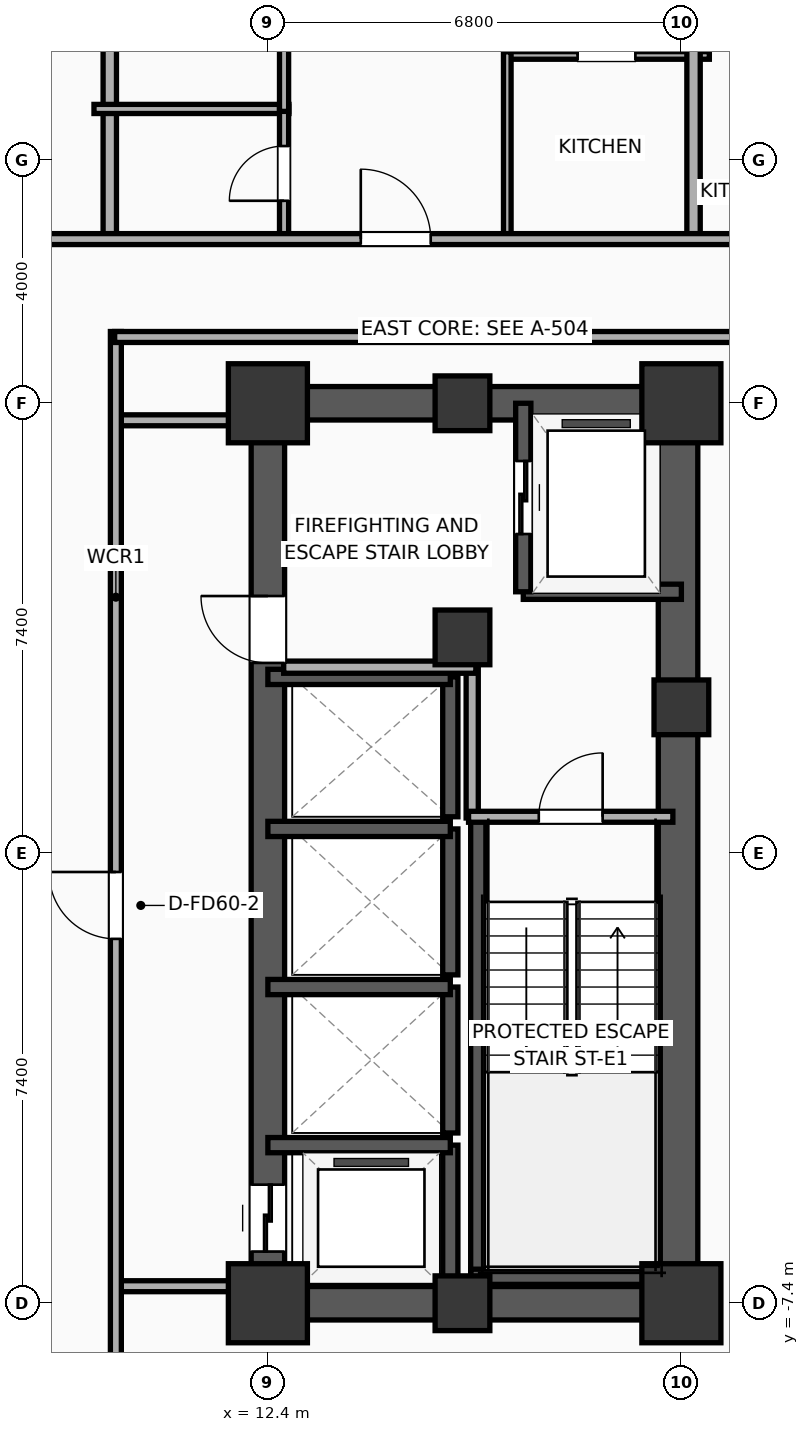
"""IFC4 building model, lengths in metres.
Left out: names, types, materials, properties, quantities, classifications, styles, units other than length and angle.
Written with IfcOpenShell. Run it as: python <this file> out.ifc"""

import sys

from ifc_helpers import new_model, si_unit, direction, frame, frame_2d, origin, origin_2d, place, context, subcontext, project, spatial, rectangle, extrude, element, fill, save


model = new_model("IFC4")
c1 = context("Model", 3, precision=1e-05, world=origin(), true_north=direction((0.0, 1.0)))
c2 = subcontext(c1, "Body", "Model", "MODEL_VIEW")
j1 = project(units=[si_unit("LENGTHUNIT", "METRE"), si_unit("PLANEANGLEUNIT", "RADIAN")], contexts=[c1])
p1 = place(None, origin())
s1 = spatial("IfcSite", under=j1, at=p1, CompositionType="ELEMENT")
p2 = place(p1, origin())
s2 = spatial("IfcBuilding", under=s1, at=p2, CompositionType="ELEMENT")
p3 = place(p2, frame((0.0, 0.0, 97.5)))
s3 = spatial("IfcBuildingStorey", under=s2, at=p3, CompositionType="ELEMENT", Elevation=97.5)
p4 = place(p3, frame((12.4, -7.4, 0.0), z_axis=(0.0, 0.0, 1.0), x_axis=(1.0, 0.0, 0.0)))
e1 = element("IfcColumn", 1, at=p4, inside=s3, PredefinedType="COLUMN", context=c2, shape_type="SweptSolid", body=[
    extrude(rectangle(XDim=1.3, YDim=1.3, at=origin_2d()), origin(), (0.0, 0.0, 1.0), 3.9),
])
p5 = place(p3, frame((15.6, 3.55, 0.0), z_axis=(0.0, 0.0, 1.0), x_axis=(1.0, 0.0, 0.0)))
e2 = element("IfcColumn", 2, at=p5, inside=s3, PredefinedType="COLUMN", context=c2, shape_type="SweptSolid", body=[
    extrude(rectangle(XDim=0.9, YDim=0.9, at=origin_2d()), origin(), (0.0, 0.0, 1.0), 3.9),
])
p6 = place(p3, frame((12.4, 7.4, 0.0), z_axis=(0.0, 0.0, 1.0), x_axis=(1.0, 0.0, 0.0)))
e3 = element("IfcColumn", 3, at=p6, inside=s3, PredefinedType="COLUMN", context=c2, shape_type="SweptSolid", body=[
    extrude(rectangle(XDim=1.3, YDim=1.3, at=origin_2d()), origin(), (0.0, 0.0, 1.0), 3.9),
])
for number, where, z_axis, x_axis in (
    (4, (15.6, -7.4, 0.0), (0.0, 0.0, 1.0), (1.0, 0.0, 0.0)),
    (5, (15.6, 7.4, 0.0), (0.0, 0.0, 1.0), (1.0, 0.0, 0.0)),
):
    element("IfcColumn", number, at=place(p3, frame(where, z_axis=z_axis, x_axis=x_axis)), inside=s3, PredefinedType="COLUMN", context=c2, shape_type="SweptSolid", body=[
        extrude(rectangle(XDim=0.9, YDim=0.9, at=origin_2d()), origin(), (0.0, 0.0, 1.0), 3.9),
    ])
p7 = place(p3, frame((19.2, -7.4, 0.0), z_axis=(0.0, 0.0, 1.0), x_axis=(1.0, 0.0, 0.0)))
e6 = element("IfcColumn", 6, at=p7, inside=s3, PredefinedType="COLUMN", context=c2, shape_type="SweptSolid", body=[
    extrude(rectangle(XDim=1.3, YDim=1.3, at=origin_2d()), origin(), (0.0, 0.0, 1.0), 3.9),
])
p8 = place(p3, frame((19.2, 2.4, 0.0), z_axis=(0.0, 0.0, 1.0), x_axis=(1.0, 0.0, 0.0)))
e7 = element("IfcColumn", 7, at=p8, inside=s3, PredefinedType="COLUMN", context=c2, shape_type="SweptSolid", body=[
    extrude(rectangle(XDim=0.9, YDim=0.9, at=origin_2d()), origin(), (0.0, 0.0, 1.0), 3.9),
])
p9 = place(p3, frame((19.2, 7.4, 0.0), z_axis=(0.0, 0.0, 1.0), x_axis=(1.0, 0.0, 0.0)))
e8 = element("IfcColumn", 8, at=p9, inside=s3, PredefinedType="COLUMN", context=c2, shape_type="SweptSolid", body=[
    extrude(rectangle(XDim=1.3, YDim=1.3, at=origin_2d()), origin(), (0.0, 0.0, 1.0), 3.9),
])
for number, where, z_axis, x_axis in (
    (9, (12.125, -7.4, 0.0), (0.0, 0.0, 1.0), (1.0, 0.0, 0.0)),
    (10, (12.125, 7.4, 0.0), (0.0, 0.0, 1.0), (1.0, 0.0, 0.0)),
):
    element("IfcWall", number, at=place(p3, frame(where, z_axis=z_axis, x_axis=x_axis)), inside=s3, PredefinedType="SHEAR", context=c2, shape_type="SweptSolid", body=[
        extrude(rectangle(XDim=7.35, YDim=0.55, at=frame_2d((3.675, 0.0))), origin(), (0.0, 0.0, 1.0), 3.65),
    ])
p10 = place(p3, frame((12.4, -7.4, 0.0), z_axis=(0.0, 0.0, 1.0), x_axis=(0.0, 1.0, 0.0)))
e11 = element("IfcWall", 11, at=p10, inside=s3, PredefinedType="SHEAR", context=c2, shape_type="SweptSolid", body=[
    extrude(rectangle(XDim=14.8, YDim=0.55, at=frame_2d((7.4, 0.0))), origin(), (0.0, 0.0, 1.0), 3.65),
])
p11 = place(p10, frame((0.85, 0.0, 0.0)))
e12 = element("IfcOpeningElement", 12, at=p11, cuts=e11, PredefinedType="OPENING", context=c2, shape_type="SweptSolid", body=[
    extrude(rectangle(XDim=1.1, YDim=2.05, at=frame_2d((0.55, 1.025))), frame((0.0, 0.285, 0.0), z_axis=(0.0, -1.0, 0.0), x_axis=(1.0, 0.0, 0.0)), (0.0, 0.0, 1.0), 0.57),
])
p12 = place(p10, frame((10.53, 0.0, 0.0)))
e13 = element("IfcOpeningElement", 13, at=p12, cuts=e11, PredefinedType="OPENING", context=c2, shape_type="SweptSolid", body=[
    extrude(rectangle(XDim=1.1, YDim=2.05, at=frame_2d((0.55, 1.025))), frame((0.0, 0.285, 0.0), z_axis=(0.0, -1.0, 0.0), x_axis=(1.0, 0.0, 0.0)), (0.0, 0.0, 1.0), 0.57),
])
p13 = place(p3, frame((19.145, -7.4, 0.0), z_axis=(0.0, 0.0, 1.0), x_axis=(0.0, 1.0, 0.0)))
e14 = element("IfcWall", 14, at=p13, inside=s3, PredefinedType="SHEAR", context=c2, shape_type="SweptSolid", body=[
    extrude(rectangle(XDim=14.8, YDim=0.65, at=frame_2d((7.4, 0.0))), origin(), (0.0, 0.0, 1.0), 3.65),
])
p14 = place(p3, frame((15.86, -7.085, 0.0), z_axis=(0.0, 0.0, 1.0), x_axis=(0.0, 1.0, 0.0)))
e15 = element("IfcWall", 15, at=p14, inside=s3, PredefinedType="SOLIDWALL", context=c2, shape_type="SweptSolid", body=[
    extrude(rectangle(XDim=7.685, YDim=0.25, at=frame_2d((3.843, 0.0))), origin(), (0.0, 0.0, 1.0), 3.65),
])
p15 = place(p3, frame((15.74, -6.965, 0.0), z_axis=(0.0, 0.0, 1.0), x_axis=(1.0, 0.0, 0.0)))
e16 = element("IfcWall", 16, at=p15, inside=s3, PredefinedType="SOLIDWALL", context=c2, shape_type="SweptSolid", body=[
    extrude(rectangle(XDim=3.46, YDim=0.25, at=frame_2d((1.73, 0.0))), origin(), (0.0, 0.0, 1.0), 3.65),
])
p16 = place(p3, frame((16.6, 4.3, 0.0), z_axis=(0.0, 0.0, 1.0), x_axis=(1.0, 0.0, 0.0)))
e17 = element("IfcWall", 17, at=p16, inside=s3, PredefinedType="SOLIDWALL", context=c2, shape_type="SweptSolid", body=[
    extrude(rectangle(XDim=2.6, YDim=0.25, at=frame_2d((1.3, 0.0))), origin(), (0.0, 0.0, 1.0), 3.65),
])
p17 = place(p3, frame((16.6, 7.4, 0.0), z_axis=(0.0, 0.0, 1.0), x_axis=(0.0, -1.0, 0.0)))
e18 = element("IfcWall", 18, at=p17, inside=s3, PredefinedType="SOLIDWALL", context=c2, shape_type="SweptSolid", body=[
    extrude(rectangle(XDim=3.1, YDim=0.25, at=frame_2d((1.55, 0.0))), origin(), (0.0, 0.0, 1.0), 3.65),
])
p18 = place(p17, frame((0.95, 0.0, 0.0)))
e19 = element("IfcOpeningElement", 19, at=p18, cuts=e18, PredefinedType="OPENING", context=c2, shape_type="SweptSolid", body=[
    extrude(rectangle(XDim=1.2, YDim=2.05, at=frame_2d((0.6, 1.025))), frame((0.0, 0.135, 0.0), z_axis=(0.0, -1.0, 0.0), x_axis=(1.0, 0.0, 0.0)), (0.0, 0.0, 1.0), 0.27),
])
p19 = place(p3, frame((15.4, -7.4, 0.0), z_axis=(0.0, 0.0, 1.0), x_axis=(0.0, 1.0, 0.0)))
e20 = element("IfcWall", 20, at=p19, inside=s3, PredefinedType="SOLIDWALL", context=c2, shape_type="SweptSolid", body=[
    extrude(rectangle(XDim=2.6, YDim=0.25, at=frame_2d((1.3, 0.0))), origin(), (0.0, 0.0, 1.0), 3.65),
])
p20 = place(p3, frame((15.4, -4.8, 0.0), z_axis=(0.0, 0.0, 1.0), x_axis=(-1.0, 0.0, 0.0)))
e21 = element("IfcWall", 21, at=p20, inside=s3, PredefinedType="SOLIDWALL", context=c2, shape_type="SweptSolid", body=[
    extrude(rectangle(XDim=3.0, YDim=0.25, at=frame_2d((1.5, 0.0))), origin(), (0.0, 0.0, 1.0), 3.65),
])
p21 = place(p3, frame((15.4, -4.6, 0.0), z_axis=(0.0, 0.0, 1.0), x_axis=(0.0, 1.0, 0.0)))
e22 = element("IfcWall", 22, at=p21, inside=s3, PredefinedType="SOLIDWALL", context=c2, shape_type="SweptSolid", body=[
    extrude(rectangle(XDim=2.4, YDim=0.25, at=frame_2d((1.2, 0.0))), origin(), (0.0, 0.0, 1.0), 3.65),
])
p22 = place(p3, frame((15.4, -2.2, 0.0), z_axis=(0.0, 0.0, 1.0), x_axis=(-1.0, 0.0, 0.0)))
e23 = element("IfcWall", 23, at=p22, inside=s3, PredefinedType="SOLIDWALL", context=c2, shape_type="SweptSolid", body=[
    extrude(rectangle(XDim=3.0, YDim=0.25, at=frame_2d((1.5, 0.0))), origin(), (0.0, 0.0, 1.0), 3.65),
])
p23 = place(p3, frame((15.4, -2.0, 0.0), z_axis=(0.0, 0.0, 1.0), x_axis=(0.0, 1.0, 0.0)))
e24 = element("IfcWall", 24, at=p23, inside=s3, PredefinedType="SOLIDWALL", context=c2, shape_type="SweptSolid", body=[
    extrude(rectangle(XDim=2.4, YDim=0.25, at=frame_2d((1.2, 0.0))), origin(), (0.0, 0.0, 1.0), 3.65),
])
p24 = place(p3, frame((15.4, 0.4, 0.0), z_axis=(0.0, 0.0, 1.0), x_axis=(-1.0, 0.0, 0.0)))
e25 = element("IfcWall", 25, at=p24, inside=s3, PredefinedType="SOLIDWALL", context=c2, shape_type="SweptSolid", body=[
    extrude(rectangle(XDim=3.0, YDim=0.25, at=frame_2d((1.5, 0.0))), origin(), (0.0, 0.0, 1.0), 3.65),
])
p25 = place(p3, frame((15.4, 0.6, 0.0), z_axis=(0.0, 0.0, 1.0), x_axis=(0.0, 1.0, 0.0)))
e26 = element("IfcWall", 26, at=p25, inside=s3, PredefinedType="SOLIDWALL", context=c2, shape_type="SweptSolid", body=[
    extrude(rectangle(XDim=2.3, YDim=0.25, at=frame_2d((1.15, 0.0))), origin(), (0.0, 0.0, 1.0), 3.65),
])
p26 = place(p3, frame((15.4, 2.9, 0.0), z_axis=(0.0, 0.0, 1.0), x_axis=(-1.0, 0.0, 0.0)))
e27 = element("IfcWall", 27, at=p26, inside=s3, PredefinedType="SOLIDWALL", context=c2, shape_type="SweptSolid", body=[
    extrude(rectangle(XDim=3.0, YDim=0.25, at=frame_2d((1.5, 0.0))), origin(), (0.0, 0.0, 1.0), 3.65),
])
p27 = place(p3, frame((15.76, 0.58, 0.0), z_axis=(0.0, 0.0, 1.0), x_axis=(0.0, 1.0, 0.0)))
e28 = element("IfcWall", 28, at=p27, inside=s3, PredefinedType="PARTITIONING", context=c2, shape_type="SweptSolid", body=[
    extrude(rectangle(XDim=2.52, YDim=0.2, at=frame_2d((1.26, 0.0))), origin(), (0.0, 0.0, 1.0), 3.65),
])
p28 = place(p3, frame((12.66, 3.06, 0.0), z_axis=(0.0, 0.0, 1.0), x_axis=(1.0, 0.0, 0.0)))
e29 = element("IfcWall", 29, at=p28, inside=s3, PredefinedType="PARTITIONING", context=c2, shape_type="SweptSolid", body=[
    extrude(rectangle(XDim=3.16, YDim=0.2, at=frame_2d((1.58, 0.0))), origin(), (0.0, 0.0, 1.0), 3.65),
])
p29 = place(p3, frame((15.7, 0.6, 0.0), z_axis=(0.0, 0.0, 1.0), x_axis=(1.0, 0.0, 0.0)))
e30 = element("IfcWall", 30, at=p29, inside=s3, PredefinedType="PARTITIONING", context=c2, shape_type="SweptSolid", body=[
    extrude(rectangle(XDim=3.36, YDim=0.18, at=frame_2d((1.68, 0.0))), origin(), (0.0, 0.0, 1.0), 3.65),
])
p30 = place(p29, frame((1.155, 0.0, 0.0)))
e31 = element("IfcOpeningElement", 31, at=p30, cuts=e30, PredefinedType="OPENING", context=c2, shape_type="SweptSolid", body=[
    extrude(rectangle(XDim=1.05, YDim=2.05, at=frame_2d((0.525, 1.025))), frame((0.0, 0.1, 0.0), z_axis=(0.0, -1.0, 0.0), x_axis=(1.0, 0.0, 0.0)), (0.0, 0.0, 1.0), 0.2),
])
for number, where, z_axis, x_axis in (
    (32, (9.88, 7.12, 0.0), (0.0, 0.0, 1.0), (1.0, 0.0, 0.0)),
    (33, (9.88, -7.12, 0.0), (0.0, 0.0, 1.0), (1.0, 0.0, 0.0)),
):
    element("IfcWall", number, at=place(p3, frame(where, z_axis=z_axis, x_axis=x_axis)), inside=s3, PredefinedType="PARTITIONING", context=c2, shape_type="SweptSolid", body=[
        extrude(rectangle(XDim=2.27, YDim=0.18, at=frame_2d((1.135, 0.0))), origin(), (0.0, 0.0, 1.0), 3.65),
    ])
p31 = place(p3, frame((9.9, -8.58, 0.0), z_axis=(0.0, 0.0, 1.0), x_axis=(0.0, 1.0, 0.0)))
e34 = element("IfcWall", 34, at=p31, inside=s3, PredefinedType="PARTITIONING", context=c2, shape_type="SweptSolid", body=[
    extrude(rectangle(XDim=17.16, YDim=0.18, at=frame_2d((8.58, 0.0))), origin(), (0.0, 0.0, 1.0), 3.65),
])
p32 = place(p31, frame((7.172, 0.0, 0.0)))
e35 = element("IfcOpeningElement", 35, at=p32, cuts=e34, PredefinedType="OPENING", context=c2, shape_type="SweptSolid", body=[
    extrude(rectangle(XDim=1.1, YDim=2.05, at=frame_2d((0.55, 1.025))), frame((0.0, 0.1, 0.0), z_axis=(0.0, -1.0, 0.0), x_axis=(1.0, 0.0, 0.0)), (0.0, 0.0, 1.0), 0.2),
])
p33 = place(p3, frame((9.88, 8.49, 0.0), z_axis=(0.0, 0.0, 1.0), x_axis=(1.0, 0.0, 0.0)))
e36 = element("IfcWall", 36, at=p33, inside=s3, PredefinedType="PARTITIONING", context=c2, shape_type="SweptSolid", body=[
    extrude(rectangle(XDim=23.33, YDim=0.18, at=frame_2d((11.665, 0.0))), origin(), (0.0, 0.0, 1.0), 3.65),
])
p34 = place(p33, frame((18.115, 0.0, 0.0)))
e37 = element("IfcOpeningElement", 37, at=p34, cuts=e36, PredefinedType="OPENING", context=c2, shape_type="SweptSolid", body=[
    extrude(rectangle(XDim=1.15, YDim=2.05, at=frame_2d((0.575, 1.025))), frame((0.0, 0.1, 0.0), z_axis=(0.0, -1.0, 0.0), x_axis=(1.0, 0.0, 0.0)), (0.0, 0.0, 1.0), 0.2),
])
p35 = place(p3, frame((9.8, 10.02, 0.0), z_axis=(0.0, 0.0, 1.0), x_axis=(0.0, 1.0, 0.0)))
e38 = element("IfcWall", 38, at=p35, inside=s3, PredefinedType="PARTITIONING", context=c2, shape_type="SweptSolid", body=[
    extrude(rectangle(XDim=11.59, YDim=0.22, at=frame_2d((5.795, 0.0))), origin(), (0.0, 0.0, 1.0), 3.65),
])
p36 = place(p3, frame((9.54, 12.24, 0.0), z_axis=(0.0, 0.0, 1.0), x_axis=(1.0, 0.0, 0.0)))
e39 = element("IfcWall", 39, at=p36, inside=s3, PredefinedType="PLUMBINGWALL", context=c2, shape_type="SweptSolid", body=[
    extrude(rectangle(XDim=3.206, YDim=0.15, at=frame_2d((1.603, 0.0))), origin(), (0.0, 0.0, 1.0), 3.65),
])
p37 = place(p3, frame((12.666, 10.08, 0.0), z_axis=(0.0, 0.0, 1.0), x_axis=(0.0, 1.0, 0.0)))
e40 = element("IfcWall", 40, at=p37, inside=s3, PredefinedType="PLUMBINGWALL", context=c2, shape_type="SweptSolid", body=[
    extrude(rectangle(XDim=2.2, YDim=0.15, at=frame_2d((1.1, 0.0))), origin(), (0.0, 0.0, 1.0), 3.65),
])
p38 = place(p37, frame((0.65, 0.0, 0.0)))
e41 = element("IfcOpeningElement", 41, at=p38, cuts=e40, PredefinedType="OPENING", context=c2, shape_type="SweptSolid", body=[
    extrude(rectangle(XDim=0.9, YDim=2.05, at=frame_2d((0.45, 1.025))), frame((0.0, 0.085, 0.0), z_axis=(0.0, -1.0, 0.0), x_axis=(1.0, 0.0, 0.0)), (0.0, 0.0, 1.0), 0.17),
])
p39 = place(p3, frame((12.666, 12.2, 0.0), z_axis=(0.0, 0.0, 1.0), x_axis=(0.0, 1.0, 0.0)))
e42 = element("IfcWall", 42, at=p39, inside=s3, PredefinedType="PLUMBINGWALL", context=c2, shape_type="SweptSolid", body=[
    extrude(rectangle(XDim=9.458, YDim=0.15, at=frame_2d((4.729, 0.0))), origin(), (0.0, 0.0, 1.0), 3.65),
])
p40 = place(p39, frame((1.063, 0.0, 0.0)))
e43 = element("IfcOpeningElement", 43, at=p40, cuts=e42, PredefinedType="OPENING", context=c2, shape_type="SweptSolid", body=[
    extrude(rectangle(XDim=0.9, YDim=2.05, at=frame_2d((0.45, 1.025))), frame((0.0, 0.085, 0.0), z_axis=(0.0, -1.0, 0.0), x_axis=(1.0, 0.0, 0.0)), (0.0, 0.0, 1.0), 0.17),
])
p41 = place(p3, frame((16.277, 13.12, 0.0), z_axis=(0.0, 0.0, 1.0), x_axis=(1.0, 0.0, 0.0)))
e44 = element("IfcWall", 44, at=p41, inside=s3, PredefinedType="PARTITIONING", context=c2, shape_type="SweptSolid", body=[
    extrude(rectangle(XDim=3.383, YDim=0.125, at=frame_2d((1.691, 0.0))), origin(), (0.0, 0.0, 1.0), 3.65),
])
p42 = place(p41, frame((1.217, 0.0, 0.0)))
e45 = element("IfcOpeningElement", 45, at=p42, cuts=e44, PredefinedType="OPENING", context=c2, shape_type="SweptSolid", body=[
    extrude(rectangle(XDim=0.95, YDim=2.05, at=frame_2d((0.475, 1.025))), frame((0.0, 0.073, 0.0), z_axis=(0.0, -1.0, 0.0), x_axis=(1.0, 0.0, 0.0)), (0.0, 0.0, 1.0), 0.145),
])
p43 = place(p3, frame((16.337, 10.08, 0.0), z_axis=(0.0, 0.0, 1.0), x_axis=(0.0, 1.0, 0.0)))
e46 = element("IfcWall", 46, at=p43, inside=s3, PredefinedType="PARTITIONING", context=c2, shape_type="SweptSolid", body=[
    extrude(rectangle(XDim=3.1, YDim=0.125, at=frame_2d((1.55, 0.0))), origin(), (0.0, 0.0, 1.0), 3.65),
])
p44 = place(p3, frame((19.4, 10.02, 0.0), z_axis=(0.0, 0.0, 1.0), x_axis=(0.0, 1.0, 0.0)))
e47 = element("IfcWall", 47, at=p44, inside=s3, PredefinedType="PARTITIONING", context=c2, shape_type="SweptSolid", body=[
    extrude(rectangle(XDim=11.59, YDim=0.22, at=frame_2d((5.795, 0.0))), origin(), (0.0, 0.0, 1.0), 3.65),
])
p45 = place(p3, frame((-29.21, 10.1, 0.0), z_axis=(0.0, 0.0, 1.0), x_axis=(1.0, 0.0, 0.0)))
e48 = element("IfcWall", 48, at=p45, inside=s3, PredefinedType="PARTITIONING", context=c2, shape_type="SweptSolid", body=[
    extrude(rectangle(XDim=62.42, YDim=0.18, at=frame_2d((31.21, 0.0))), origin(), (0.0, 0.0, 1.0), 3.65),
])
p46 = place(p45, frame((4.906, 0.0, 0.0)))
e49 = element("IfcOpeningElement", 49, at=p46, cuts=e48, PredefinedType="OPENING", context=c2, shape_type="SweptSolid", body=[
    extrude(rectangle(XDim=1.15, YDim=2.05, at=frame_2d((0.575, 1.025))), frame((0.0, 0.1, 0.0), z_axis=(0.0, -1.0, 0.0), x_axis=(1.0, 0.0, 0.0)), (0.0, 0.0, 1.0), 0.2),
])
p47 = place(p45, frame((14.812, 0.0, 0.0)))
e50 = element("IfcOpeningElement", 50, at=p47, cuts=e48, PredefinedType="OPENING", context=c2, shape_type="SweptSolid", body=[
    extrude(rectangle(XDim=1.15, YDim=2.05, at=frame_2d((0.575, 1.025))), frame((0.0, 0.1, 0.0), z_axis=(0.0, -1.0, 0.0), x_axis=(1.0, 0.0, 0.0)), (0.0, 0.0, 1.0), 0.2),
])
p48 = place(p45, frame((24.406, 0.0, 0.0)))
e51 = element("IfcOpeningElement", 51, at=p48, cuts=e48, PredefinedType="OPENING", context=c2, shape_type="SweptSolid", body=[
    extrude(rectangle(XDim=1.15, YDim=2.05, at=frame_2d((0.575, 1.025))), frame((0.0, 0.1, 0.0), z_axis=(0.0, -1.0, 0.0), x_axis=(1.0, 0.0, 0.0)), (0.0, 0.0, 1.0), 0.2),
])
p49 = place(p45, frame((33.981, 0.0, 0.0)))
e52 = element("IfcOpeningElement", 52, at=p49, cuts=e48, PredefinedType="OPENING", context=c2, shape_type="SweptSolid", body=[
    extrude(rectangle(XDim=1.15, YDim=2.05, at=frame_2d((0.575, 1.025))), frame((0.0, 0.1, 0.0), z_axis=(0.0, -1.0, 0.0), x_axis=(1.0, 0.0, 0.0)), (0.0, 0.0, 1.0), 0.2),
])
p50 = place(p45, frame((43.138, 0.0, 0.0)))
e53 = element("IfcOpeningElement", 53, at=p50, cuts=e48, PredefinedType="OPENING", context=c2, shape_type="SweptSolid", body=[
    extrude(rectangle(XDim=1.15, YDim=2.05, at=frame_2d((0.575, 1.025))), frame((0.0, 0.1, 0.0), z_axis=(0.0, -1.0, 0.0), x_axis=(1.0, 0.0, 0.0)), (0.0, 0.0, 1.0), 0.2),
])
p51 = place(p45, frame((51.777, 0.0, 0.0)))
e54 = element("IfcOpeningElement", 54, at=p51, cuts=e48, PredefinedType="OPENING", context=c2, shape_type="SweptSolid", body=[
    extrude(rectangle(XDim=0.9, YDim=2.05, at=frame_2d((0.45, 1.025))), frame((0.0, 0.1, 0.0), z_axis=(0.0, -1.0, 0.0), x_axis=(1.0, 0.0, 0.0)), (0.0, 0.0, 1.0), 0.2),
])
p52 = place(p45, frame((58.718, 0.0, 0.0)))
e55 = element("IfcOpeningElement", 55, at=p52, cuts=e48, PredefinedType="OPENING", context=c2, shape_type="SweptSolid", body=[
    extrude(rectangle(XDim=0.9, YDim=2.05, at=frame_2d((0.45, 1.025))), frame((0.0, 0.1, 0.0), z_axis=(0.0, -1.0, 0.0), x_axis=(1.0, 0.0, 0.0)), (0.0, 0.0, 1.0), 0.2),
])
p53 = place(p18, origin())
e56 = element("IfcDoor", 56, at=p53, inside=s3, OperationType="SLIDING_TO_LEFT", PredefinedType="DOOR", context=c2, shape_type="SweptSolid", body=[
    extrude(rectangle(XDim=1.2, YDim=2.05, at=frame_2d((0.6, 1.025))), frame((0.0, 0.025, 0.0), z_axis=(0.0, -1.0, 0.0), x_axis=(1.0, 0.0, 0.0)), (0.0, 0.0, 1.0), 0.05),
])
fill(e19, e56)
p54 = place(p11, origin())
e57 = element("IfcDoor", 57, at=p54, inside=s3, OperationType="SLIDING_TO_LEFT", PredefinedType="DOOR", context=c2, shape_type="SweptSolid", body=[
    extrude(rectangle(XDim=1.1, YDim=2.05, at=frame_2d((0.55, 1.025))), frame((0.0, 0.025, 0.0), z_axis=(0.0, -1.0, 0.0), x_axis=(1.0, 0.0, 0.0)), (0.0, 0.0, 1.0), 0.05),
])
fill(e12, e57)
p55 = place(p30, origin())
e58 = element("IfcDoor", 58, at=p55, inside=s3, OperationType="SINGLE_SWING_RIGHT", PredefinedType="DOOR", context=c2, shape_type="SweptSolid", body=[
    extrude(rectangle(XDim=1.05, YDim=2.05, at=frame_2d((0.525, 1.025))), frame((0.0, 0.025, 0.0), z_axis=(0.0, -1.0, 0.0), x_axis=(1.0, 0.0, 0.0)), (0.0, 0.0, 1.0), 0.05),
])
fill(e31, e58)
p56 = place(p32, origin())
e59 = element("IfcDoor", 59, at=p56, inside=s3, OperationType="SINGLE_SWING_RIGHT", PredefinedType="DOOR", context=c2, shape_type="SweptSolid", body=[
    extrude(rectangle(XDim=1.1, YDim=2.05, at=frame_2d((0.55, 1.025))), frame((0.0, 0.025, 0.0), z_axis=(0.0, -1.0, 0.0), x_axis=(1.0, 0.0, 0.0)), (0.0, 0.0, 1.0), 0.05),
])
fill(e35, e59)
p57 = place(p38, origin())
e60 = element("IfcDoor", 60, at=p57, inside=s3, OperationType="SINGLE_SWING_LEFT", PredefinedType="DOOR", context=c2, shape_type="SweptSolid", body=[
    extrude(rectangle(XDim=0.9, YDim=2.05, at=frame_2d((0.45, 1.025))), frame((0.0, 0.025, 0.0), z_axis=(0.0, -1.0, 0.0), x_axis=(1.0, 0.0, 0.0)), (0.0, 0.0, 1.0), 0.05),
])
fill(e41, e60)
p58 = place(p42, origin())
e61 = element("IfcDoor", 61, at=p58, inside=s3, OperationType="SINGLE_SWING_LEFT", PredefinedType="DOOR", context=c2, shape_type="SweptSolid", body=[
    extrude(rectangle(XDim=0.95, YDim=2.05, at=frame_2d((0.475, 1.025))), frame((0.0, 0.025, 0.0), z_axis=(0.0, -1.0, 0.0), x_axis=(1.0, 0.0, 0.0)), (0.0, 0.0, 1.0), 0.05),
])
fill(e45, e61)
p59 = place(p50, origin())
e62 = element("IfcDoor", 62, at=p59, inside=s3, OperationType="SINGLE_SWING_LEFT", PredefinedType="DOOR", context=c2, shape_type="SweptSolid", body=[
    extrude(rectangle(XDim=1.15, YDim=2.05, at=frame_2d((0.575, 1.025))), frame((0.0, 0.025, 0.0), z_axis=(0.0, -1.0, 0.0), x_axis=(1.0, 0.0, 0.0)), (0.0, 0.0, 1.0), 0.05),
])
fill(e53, e62)
p60 = place(p12, origin())
e63 = element("IfcDoor", 63, at=p60, inside=s3, OperationType="SINGLE_SWING_RIGHT", PredefinedType="DOOR", context=c2, shape_type="SweptSolid", body=[
    extrude(rectangle(XDim=1.1, YDim=2.05, at=frame_2d((0.55, 1.025))), frame((0.0, 0.025, 0.0), z_axis=(0.0, -1.0, 0.0), x_axis=(1.0, 0.0, 0.0)), (0.0, 0.0, 1.0), 0.05),
])
fill(e13, e63)
save(model, sys.argv[1])
